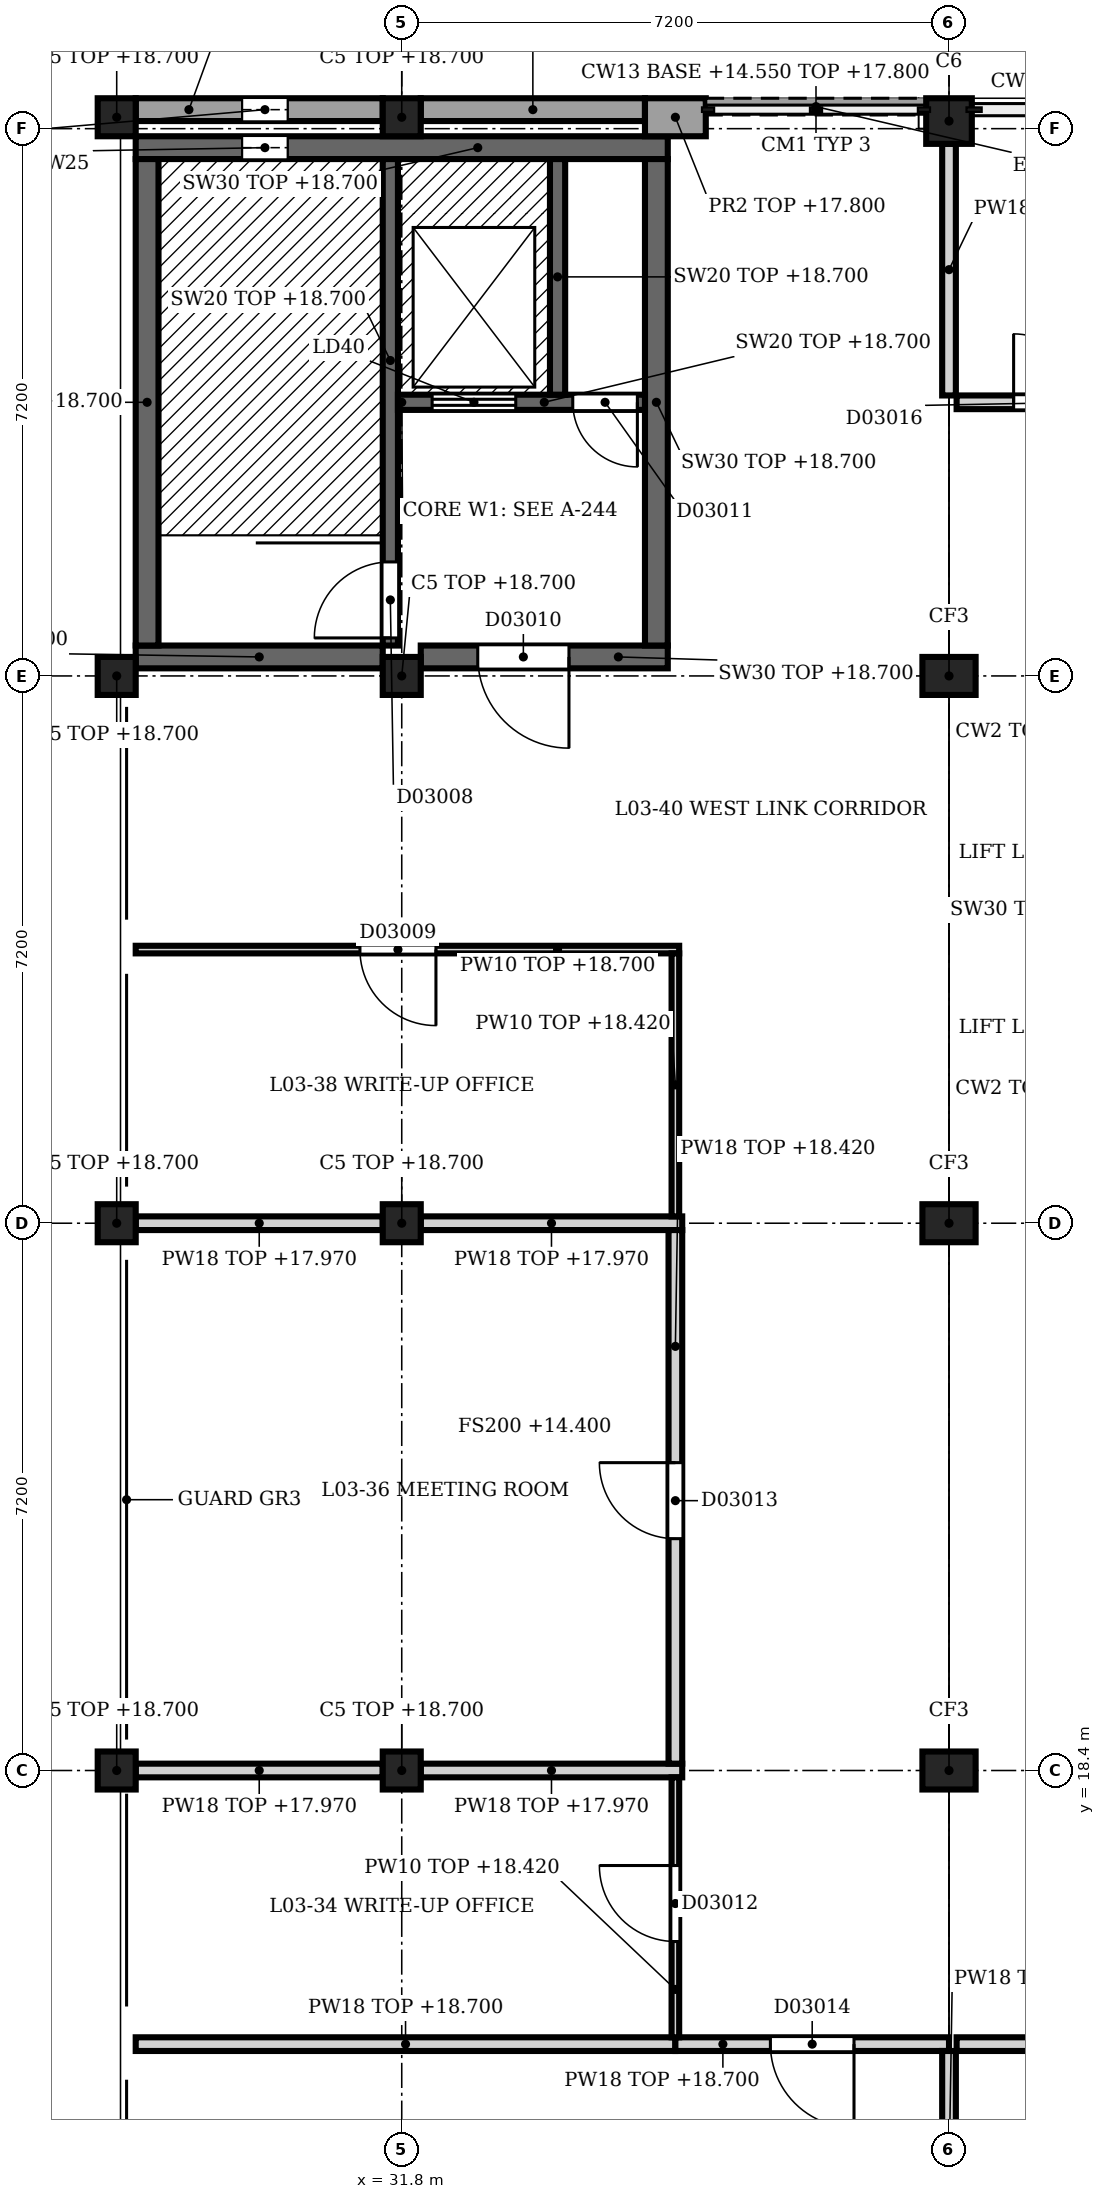
"""IFC4 building model, lengths in metres.
Left out: names, types, materials, properties, quantities, classifications, styles, units other than length and angle.
Written with IfcOpenShell. Run it as: python <this file> out.ifc"""

import sys

from ifc_helpers import new_model, si_unit, direction, frame, frame_2d, origin, origin_2d, place, context, subcontext, project, spatial, rectangle, extrude, element, fill, save


model = new_model("IFC4")
c1 = context("Model", 3, precision=1e-05, world=origin(), true_north=direction((0.0, 1.0)))
c2 = subcontext(c1, "Body", "Model", "MODEL_VIEW")
j1 = project(units=[si_unit("LENGTHUNIT", "METRE"), si_unit("PLANEANGLEUNIT", "RADIAN")], contexts=[c1])
p1 = place(None, origin())
s1 = spatial("IfcSite", under=j1, at=p1, CompositionType="ELEMENT")
p2 = place(p1, origin())
s2 = spatial("IfcBuilding", under=s1, at=p2, CompositionType="ELEMENT")
p3 = place(p2, frame((0.0, 0.0, 14.4)))
s3 = spatial("IfcBuildingStorey", under=s2, at=p3, CompositionType="ELEMENT", Elevation=14.4)
for number, where, z_axis, x_axis in (
    (1, (39.0, 18.4, 0.0), (0.0, 0.0, 1.0), (1.0, 0.0, 0.0)),
    (2, (39.0, 25.6, 0.0), (0.0, 0.0, 1.0), (1.0, 0.0, 0.0)),
    (3, (39.0, 32.8, 0.0), (0.0, 0.0, 1.0), (1.0, 0.0, 0.0)),
):
    element("IfcColumn", number, at=place(p3, frame(where, z_axis=z_axis, x_axis=x_axis)), inside=s3, PredefinedType="COLUMN", context=c2, shape_type="SweptSolid", body=[
        extrude(rectangle(XDim=0.7, YDim=0.5, at=origin_2d()), origin(), (0.0, 0.0, 1.0), 4.5),
    ])
p4 = place(p3, frame((39.0, 40.1, 0.0), z_axis=(0.0, 0.0, 1.0), x_axis=(1.0, 0.0, 0.0)))
e4 = element("IfcColumn", 4, at=p4, inside=s3, PredefinedType="COLUMN", context=c2, shape_type="SweptSolid", body=[
    extrude(rectangle(XDim=0.6, YDim=0.6, at=origin_2d()), origin(), (0.0, 0.0, 1.0), 4.5),
])
for number, where, z_axis, x_axis in (
    (5, (28.05, 18.4, 0.0), (0.0, 0.0, 1.0), (1.0, 0.0, 0.0)),
    (6, (28.05, 25.6, 0.0), (0.0, 0.0, 1.0), (1.0, 0.0, 0.0)),
    (7, (28.05, 32.8, 0.0), (0.0, 0.0, 1.0), (1.0, 0.0, 0.0)),
    (8, (28.05, 40.15, 0.0), (0.0, 0.0, 1.0), (1.0, 0.0, 0.0)),
    (9, (31.8, 18.4, 0.0), (0.0, 0.0, 1.0), (1.0, 0.0, 0.0)),
    (10, (31.8, 25.6, 0.0), (0.0, 0.0, 1.0), (1.0, 0.0, 0.0)),
    (11, (31.8, 32.8, 0.0), (0.0, 0.0, 1.0), (1.0, 0.0, 0.0)),
    (12, (31.8, 40.15, 0.0), (0.0, 0.0, 1.0), (1.0, 0.0, 0.0)),
):
    element("IfcColumn", number, at=place(p3, frame(where, z_axis=z_axis, x_axis=x_axis)), inside=s3, PredefinedType="COLUMN", context=c2, shape_type="SweptSolid", body=[
        extrude(rectangle(XDim=0.5, YDim=0.5, at=origin_2d()), origin(), (0.0, 0.0, 1.0), 4.3),
    ])
p5 = place(p3, frame((35.0, 40.15, 0.0), z_axis=(0.0, 0.0, 1.0), x_axis=(1.0, 0.0, 0.0)))
e13 = element("IfcWall", 13, at=p5, inside=s3, PredefinedType="SOLIDWALL", context=c2, shape_type="SweptSolid", body=[
    extrude(rectangle(XDim=0.8, YDim=0.5, at=frame_2d((0.4, 0.0))), origin(), (0.0, 0.0, 1.0), 3.4),
])
p6 = place(p3, frame((28.3, 40.25, 0.0), z_axis=(0.0, 0.0, 1.0), x_axis=(1.0, 0.0, 0.0)))
e14 = element("IfcWall", 14, at=p6, inside=s3, PredefinedType="SOLIDWALL", context=c2, shape_type="SweptSolid", body=[
    extrude(rectangle(XDim=3.25, YDim=0.3, at=frame_2d((1.625, 0.0))), origin(), (0.0, 0.0, 1.0), 3.4),
])
p7 = place(p6, frame((1.4, 0.0, 1.2)))
e15 = element("IfcOpeningElement", 15, at=p7, cuts=e14, PredefinedType="OPENING", context=c2, shape_type="SweptSolid", body=[
    extrude(rectangle(XDim=0.6, YDim=1.8, at=frame_2d((0.3, 0.9))), frame((0.0, 0.16, 0.0), z_axis=(0.0, -1.0, 0.0), x_axis=(1.0, 0.0, 0.0)), (0.0, 0.0, 1.0), 0.32),
])
p8 = place(p3, frame((32.05, 40.25, 0.0), z_axis=(0.0, 0.0, 1.0), x_axis=(1.0, 0.0, 0.0)))
e16 = element("IfcWall", 16, at=p8, inside=s3, PredefinedType="SOLIDWALL", context=c2, shape_type="SweptSolid", body=[
    extrude(rectangle(XDim=2.95, YDim=0.3, at=frame_2d((1.475, 0.0))), origin(), (0.0, 0.0, 1.0), 3.4),
])
p9 = place(p3, frame((35.8, 40.29, 0.0), z_axis=(0.0, 0.0, 1.0), x_axis=(1.0, 0.0, 0.0)))
e17 = element("IfcWall", 17, at=p9, inside=s3, PredefinedType="SOLIDWALL", context=c2, shape_type="SweptSolid", body=[
    extrude(rectangle(XDim=2.9, YDim=0.22, at=frame_2d((1.45, 0.0))), origin(), (0.0, 0.0, 1.0), 0.15),
])
p10 = place(p3, frame((28.3, 33.05, 0.0), z_axis=(0.0, 0.0, 1.0), x_axis=(1.0, 0.0, 0.0)))
e18 = element("IfcWall", 18, at=p10, inside=s3, PredefinedType="SHEAR", context=c2, shape_type="SweptSolid", body=[
    extrude(rectangle(XDim=3.25, YDim=0.3, at=frame_2d((1.625, 0.0))), origin(), (0.0, 0.0, 1.0), 4.3),
])
p11 = place(p3, frame((32.05, 33.05, 0.0), z_axis=(0.0, 0.0, 1.0), x_axis=(1.0, 0.0, 0.0)))
e19 = element("IfcWall", 19, at=p11, inside=s3, PredefinedType="SHEAR", context=c2, shape_type="SweptSolid", body=[
    extrude(rectangle(XDim=3.25, YDim=0.3, at=frame_2d((1.625, 0.0))), origin(), (0.0, 0.0, 1.0), 4.3),
])
p12 = place(p11, frame((0.75, 0.0, 0.0)))
e20 = element("IfcOpeningElement", 20, at=p12, cuts=e19, PredefinedType="OPENING", context=c2, shape_type="SweptSolid", body=[
    extrude(rectangle(XDim=1.2, YDim=2.1, at=frame_2d((0.6, 1.05))), frame((0.0, 0.16, 0.0), z_axis=(0.0, -1.0, 0.0), x_axis=(1.0, 0.0, 0.0)), (0.0, 0.0, 1.0), 0.32),
])
p13 = place(p3, frame((28.3, 39.75, 0.0), z_axis=(0.0, 0.0, 1.0), x_axis=(1.0, 0.0, 0.0)))
e21 = element("IfcWall", 21, at=p13, inside=s3, PredefinedType="SHEAR", context=c2, shape_type="SweptSolid", body=[
    extrude(rectangle(XDim=7.0, YDim=0.3, at=frame_2d((3.5, 0.0))), origin(), (0.0, 0.0, 1.0), 4.3),
])
p14 = place(p13, frame((1.4, 0.0, 1.2)))
e22 = element("IfcOpeningElement", 22, at=p14, cuts=e21, PredefinedType="OPENING", context=c2, shape_type="SweptSolid", body=[
    extrude(rectangle(XDim=0.6, YDim=1.8, at=frame_2d((0.3, 0.9))), frame((0.0, 0.16, 0.0), z_axis=(0.0, -1.0, 0.0), x_axis=(1.0, 0.0, 0.0)), (0.0, 0.0, 1.0), 0.32),
])
for number, where, z_axis, x_axis in (
    (23, (28.45, 33.2, 0.0), (0.0, 0.0, 1.0), (0.0, 1.0, 0.0)),
    (24, (35.15, 33.2, 0.0), (0.0, 0.0, 1.0), (0.0, 1.0, 0.0)),
):
    element("IfcWall", number, at=place(p3, frame(where, z_axis=z_axis, x_axis=x_axis)), inside=s3, PredefinedType="SHEAR", context=c2, shape_type="SweptSolid", body=[
        extrude(rectangle(XDim=6.4, YDim=0.3, at=frame_2d((3.2, 0.0))), origin(), (0.0, 0.0, 1.0), 4.3),
    ])
p15 = place(p3, frame((31.65, 33.2, 0.0), z_axis=(0.0, 0.0, 1.0), x_axis=(0.0, 1.0, 0.0)))
e25 = element("IfcWall", 25, at=p15, inside=s3, PredefinedType="SHEAR", context=c2, shape_type="SweptSolid", body=[
    extrude(rectangle(XDim=6.4, YDim=0.2, at=frame_2d((3.2, 0.0))), origin(), (0.0, 0.0, 1.0), 4.3),
])
p16 = place(p15, frame((0.1, 0.0, 0.0)))
e26 = element("IfcOpeningElement", 26, at=p16, cuts=e25, PredefinedType="OPENING", context=c2, shape_type="SweptSolid", body=[
    extrude(rectangle(XDim=1.0, YDim=2.1, at=frame_2d((0.5, 1.05))), frame((0.0, 0.11, 0.0), z_axis=(0.0, -1.0, 0.0), x_axis=(1.0, 0.0, 0.0)), (0.0, 0.0, 1.0), 0.22),
])
p17 = place(p3, frame((35.0, 36.4, 0.0), z_axis=(0.0, 0.0, 1.0), x_axis=(-1.0, 0.0, 0.0)))
e27 = element("IfcWall", 27, at=p17, inside=s3, PredefinedType="SHEAR", context=c2, shape_type="SweptSolid", body=[
    extrude(rectangle(XDim=3.25, YDim=0.2, at=frame_2d((1.625, 0.0))), origin(), (0.0, 0.0, 1.0), 4.3),
])
p18 = place(p17, frame((1.7, 0.0, 0.0)))
e28 = element("IfcOpeningElement", 28, at=p18, cuts=e27, PredefinedType="OPENING", context=c2, shape_type="SweptSolid", body=[
    extrude(rectangle(XDim=1.1, YDim=2.1, at=frame_2d((0.55, 1.05))), frame((0.0, 0.11, 0.0), z_axis=(0.0, -1.0, 0.0), x_axis=(1.0, 0.0, 0.0)), (0.0, 0.0, 1.0), 0.22),
])
p19 = place(p17, frame((0.1, 0.0, 0.0)))
e29 = element("IfcOpeningElement", 29, at=p19, cuts=e27, PredefinedType="OPENING", context=c2, shape_type="SweptSolid", body=[
    extrude(rectangle(XDim=0.85, YDim=2.1, at=frame_2d((0.425, 1.05))), frame((0.0, 0.11, 0.0), z_axis=(0.0, -1.0, 0.0), x_axis=(1.0, 0.0, 0.0)), (0.0, 0.0, 1.0), 0.22),
])
p20 = place(p3, frame((33.85, 36.5, 0.0), z_axis=(0.0, 0.0, 1.0), x_axis=(0.0, 1.0, 0.0)))
e30 = element("IfcWall", 30, at=p20, inside=s3, PredefinedType="SHEAR", context=c2, shape_type="SweptSolid", body=[
    extrude(rectangle(XDim=3.1, YDim=0.2, at=frame_2d((1.55, 0.0))), origin(), (0.0, 0.0, 1.0), 4.3),
])
p21 = place(p3, frame((28.3, 14.8, 0.0), z_axis=(0.0, 0.0, 1.0), x_axis=(1.0, 0.0, 0.0)))
e31 = element("IfcWall", 31, at=p21, inside=s3, PredefinedType="PARTITIONING", context=c2, shape_type="SweptSolid", body=[
    extrude(rectangle(XDim=7.1, YDim=0.18, at=frame_2d((3.55, 0.0))), origin(), (0.0, 0.0, 1.0), 4.3),
])
p22 = place(p3, frame((39.0, 14.8, 0.0), z_axis=(0.0, 0.0, 1.0), x_axis=(-1.0, 0.0, 0.0)))
e32 = element("IfcWall", 32, at=p22, inside=s3, PredefinedType="PARTITIONING", context=c2, shape_type="SweptSolid", body=[
    extrude(rectangle(XDim=3.6, YDim=0.18, at=frame_2d((1.8, 0.0))), origin(), (0.0, 0.0, 1.0), 4.3),
])
p23 = place(p22, frame((1.25, 0.0, 0.0)))
e33 = element("IfcOpeningElement", 33, at=p23, cuts=e32, PredefinedType="OPENING", context=c2, shape_type="SweptSolid", body=[
    extrude(rectangle(XDim=1.1, YDim=2.3, at=frame_2d((0.55, 1.15))), frame((0.0, 0.1, 0.0), z_axis=(0.0, -1.0, 0.0), x_axis=(1.0, 0.0, 0.0)), (0.0, 0.0, 1.0), 0.2),
])
p24 = place(p3, frame((42.5, 14.8, 0.0), z_axis=(0.0, 0.0, 1.0), x_axis=(-1.0, 0.0, 0.0)))
e34 = element("IfcWall", 34, at=p24, inside=s3, PredefinedType="PARTITIONING", context=c2, shape_type="SweptSolid", body=[
    extrude(rectangle(XDim=3.4, YDim=0.18, at=frame_2d((1.7, 0.0))), origin(), (0.0, 0.0, 1.0), 11.4),
])
p25 = place(p24, frame((1.15, 0.0, 0.0)))
e35 = element("IfcOpeningElement", 35, at=p25, cuts=e34, PredefinedType="OPENING", context=c2, shape_type="SweptSolid", body=[
    extrude(rectangle(XDim=1.1, YDim=2.3, at=frame_2d((0.55, 1.15))), frame((0.0, 0.1, 0.0), z_axis=(0.0, -1.0, 0.0), x_axis=(1.0, 0.0, 0.0)), (0.0, 0.0, 1.0), 0.2),
])
p26 = place(p3, frame((28.3, 18.4, 0.0), z_axis=(0.0, 0.0, 1.0), x_axis=(1.0, 0.0, 0.0)))
e36 = element("IfcWall", 36, at=p26, inside=s3, PredefinedType="PARTITIONING", context=c2, shape_type="SweptSolid", body=[
    extrude(rectangle(XDim=3.25, YDim=0.18, at=frame_2d((1.625, 0.0))), origin(), (0.0, 0.0, 1.0), 3.57),
])
p27 = place(p3, frame((32.05, 18.4, 0.0), z_axis=(0.0, 0.0, 1.0), x_axis=(1.0, 0.0, 0.0)))
e37 = element("IfcWall", 37, at=p27, inside=s3, PredefinedType="PARTITIONING", context=c2, shape_type="SweptSolid", body=[
    extrude(rectangle(XDim=3.44, YDim=0.18, at=frame_2d((1.72, 0.0))), origin(), (0.0, 0.0, 1.0), 3.57),
])
p28 = place(p3, frame((28.3, 25.6, 0.0), z_axis=(0.0, 0.0, 1.0), x_axis=(1.0, 0.0, 0.0)))
e38 = element("IfcWall", 38, at=p28, inside=s3, PredefinedType="PARTITIONING", context=c2, shape_type="SweptSolid", body=[
    extrude(rectangle(XDim=3.25, YDim=0.18, at=frame_2d((1.625, 0.0))), origin(), (0.0, 0.0, 1.0), 3.57),
])
p29 = place(p3, frame((32.05, 25.6, 0.0), z_axis=(0.0, 0.0, 1.0), x_axis=(1.0, 0.0, 0.0)))
e39 = element("IfcWall", 39, at=p29, inside=s3, PredefinedType="PARTITIONING", context=c2, shape_type="SweptSolid", body=[
    extrude(rectangle(XDim=3.44, YDim=0.18, at=frame_2d((1.72, 0.0))), origin(), (0.0, 0.0, 1.0), 3.57),
])
p30 = place(p3, frame((35.45, 29.2, 0.0), z_axis=(0.0, 0.0, 1.0), x_axis=(-1.0, 0.0, 0.0)))
e40 = element("IfcWall", 40, at=p30, inside=s3, PredefinedType="PARTITIONING", context=c2, shape_type="SweptSolid", body=[
    extrude(rectangle(XDim=7.15, YDim=0.1, at=frame_2d((3.575, 0.0))), origin(), (0.0, 0.0, 1.0), 4.3),
])
p31 = place(p30, frame((3.2, 0.0, 0.0)))
e41 = element("IfcOpeningElement", 41, at=p31, cuts=e40, PredefinedType="OPENING", context=c2, shape_type="SweptSolid", body=[
    extrude(rectangle(XDim=1.0, YDim=2.1, at=frame_2d((0.5, 1.05))), frame((0.0, 0.06, 0.0), z_axis=(0.0, -1.0, 0.0), x_axis=(1.0, 0.0, 0.0)), (0.0, 0.0, 1.0), 0.12),
])
p32 = place(p3, frame((42.5, 36.4, 0.0), z_axis=(0.0, 0.0, 1.0), x_axis=(-1.0, 0.0, 0.0)))
e42 = element("IfcWall", 42, at=p32, inside=s3, PredefinedType="PARTITIONING", context=c2, shape_type="SweptSolid", body=[
    extrude(rectangle(XDim=3.4, YDim=0.18, at=frame_2d((1.7, 0.0))), origin(), (0.0, 0.0, 1.0), 11.4),
])
p33 = place(p32, frame((0.85, 0.0, 0.0)))
e43 = element("IfcOpeningElement", 43, at=p33, cuts=e42, PredefinedType="OPENING", context=c2, shape_type="SweptSolid", body=[
    extrude(rectangle(XDim=1.8, YDim=2.3, at=frame_2d((0.9, 1.15))), frame((0.0, 0.1, 0.0), z_axis=(0.0, -1.0, 0.0), x_axis=(1.0, 0.0, 0.0)), (0.0, 0.0, 1.0), 0.2),
])
p34 = place(p3, frame((35.4, 14.89, 0.0), z_axis=(0.0, 0.0, 1.0), x_axis=(0.0, 1.0, 0.0)))
e44 = element("IfcWall", 44, at=p34, inside=s3, PredefinedType="PARTITIONING", context=c2, shape_type="SweptSolid", body=[
    extrude(rectangle(XDim=3.42, YDim=0.1, at=frame_2d((1.71, 0.0))), origin(), (0.0, 0.0, 1.0), 4.02),
])
p35 = place(p34, frame((1.26, 0.0, 0.0)))
e45 = element("IfcOpeningElement", 45, at=p35, cuts=e44, PredefinedType="OPENING", context=c2, shape_type="SweptSolid", body=[
    extrude(rectangle(XDim=1.0, YDim=2.1, at=frame_2d((0.5, 1.05))), frame((0.0, 0.06, 0.0), z_axis=(0.0, -1.0, 0.0), x_axis=(1.0, 0.0, 0.0)), (0.0, 0.0, 1.0), 0.12),
])
p36 = place(p3, frame((35.4, 18.49, 0.0), z_axis=(0.0, 0.0, 1.0), x_axis=(0.0, 1.0, 0.0)))
e46 = element("IfcWall", 46, at=p36, inside=s3, PredefinedType="PARTITIONING", context=c2, shape_type="SweptSolid", body=[
    extrude(rectangle(XDim=7.02, YDim=0.18, at=frame_2d((3.51, 0.0))), origin(), (0.0, 0.0, 1.0), 4.02),
])
p37 = place(p36, frame((2.96, 0.0, 0.0)))
e47 = element("IfcOpeningElement", 47, at=p37, cuts=e46, PredefinedType="OPENING", context=c2, shape_type="SweptSolid", body=[
    extrude(rectangle(XDim=1.0, YDim=2.1, at=frame_2d((0.5, 1.05))), frame((0.0, 0.1, 0.0), z_axis=(0.0, -1.0, 0.0), x_axis=(1.0, 0.0, 0.0)), (0.0, 0.0, 1.0), 0.2),
])
p38 = place(p3, frame((35.4, 25.69, 0.0), z_axis=(0.0, 0.0, 1.0), x_axis=(0.0, 1.0, 0.0)))
e48 = element("IfcWall", 48, at=p38, inside=s3, PredefinedType="PARTITIONING", context=c2, shape_type="SweptSolid", body=[
    extrude(rectangle(XDim=3.46, YDim=0.1, at=frame_2d((1.73, 0.0))), origin(), (0.0, 0.0, 1.0), 4.02),
])
for number, where, z_axis, x_axis in (
    (49, (39.0, 11.4, 0.0), (0.0, 0.0, 1.0), (0.0, 1.0, 0.0)),
    (50, (39.0, 36.49, 0.0), (0.0, 0.0, 1.0), (0.0, 1.0, 0.0)),
):
    element("IfcWall", number, at=place(p3, frame(where, z_axis=z_axis, x_axis=x_axis)), inside=s3, PredefinedType="PARTITIONING", context=c2, shape_type="SweptSolid", body=[
        extrude(rectangle(XDim=3.31, YDim=0.18, at=frame_2d((1.655, 0.0))), origin(), (0.0, 0.0, 1.0), 3.77),
    ])
p39 = place(p7, origin())
e51 = element("IfcWindow", 51, at=p39, inside=s3, PartitioningType="SINGLE_PANEL", PredefinedType="WINDOW", context=c2, shape_type="SweptSolid", body=[
    extrude(rectangle(XDim=0.6, YDim=1.8, at=frame_2d((0.3, 0.9))), frame((0.0, 0.03, 0.0), z_axis=(0.0, -1.0, 0.0), x_axis=(1.0, 0.0, 0.0)), (0.0, 0.0, 1.0), 0.06),
])
fill(e15, e51)
p40 = place(p12, origin())
e52 = element("IfcDoor", 52, at=p40, inside=s3, OperationType="SINGLE_SWING_LEFT", PredefinedType="DOOR", context=c2, shape_type="SweptSolid", body=[
    extrude(rectangle(XDim=1.2, YDim=2.1, at=frame_2d((0.6, 1.05))), frame((0.0, 0.025, 0.0), z_axis=(0.0, -1.0, 0.0), x_axis=(1.0, 0.0, 0.0)), (0.0, 0.0, 1.0), 0.05),
])
fill(e20, e52)
p41 = place(p18, origin())
e53 = element("IfcDoor", 53, at=p41, inside=s3, OperationType="DOUBLE_DOOR_SLIDING", PredefinedType="DOOR", context=c2, shape_type="SweptSolid", body=[
    extrude(rectangle(XDim=1.1, YDim=2.1, at=frame_2d((0.55, 1.05))), frame((0.0, 0.025, 0.0), z_axis=(0.0, -1.0, 0.0), x_axis=(1.0, 0.0, 0.0)), (0.0, 0.0, 1.0), 0.05),
])
fill(e28, e53)
p42 = place(p19, origin())
e54 = element("IfcDoor", 54, at=p42, inside=s3, OperationType="SINGLE_SWING_LEFT", PredefinedType="DOOR", context=c2, shape_type="SweptSolid", body=[
    extrude(rectangle(XDim=0.85, YDim=2.1, at=frame_2d((0.425, 1.05))), frame((0.0, 0.025, 0.0), z_axis=(0.0, -1.0, 0.0), x_axis=(1.0, 0.0, 0.0)), (0.0, 0.0, 1.0), 0.05),
])
fill(e29, e54)
p43 = place(p16, origin())
e55 = element("IfcDoor", 55, at=p43, inside=s3, OperationType="SINGLE_SWING_LEFT", PredefinedType="DOOR", context=c2, shape_type="SweptSolid", body=[
    extrude(rectangle(XDim=1.0, YDim=2.1, at=frame_2d((0.5, 1.05))), frame((0.0, 0.025, 0.0), z_axis=(0.0, -1.0, 0.0), x_axis=(1.0, 0.0, 0.0)), (0.0, 0.0, 1.0), 0.05),
])
fill(e26, e55)
p44 = place(p14, origin())
e56 = element("IfcWindow", 56, at=p44, inside=s3, PartitioningType="SINGLE_PANEL", PredefinedType="WINDOW", context=c2, shape_type="SweptSolid", body=[
    extrude(rectangle(XDim=0.6, YDim=1.8, at=frame_2d((0.3, 0.9))), frame((0.0, 0.03, 0.0), z_axis=(0.0, -1.0, 0.0), x_axis=(1.0, 0.0, 0.0)), (0.0, 0.0, 1.0), 0.06),
])
fill(e22, e56)
p45 = place(p23, origin())
e57 = element("IfcDoor", 57, at=p45, inside=s3, OperationType="SINGLE_SWING_LEFT", PredefinedType="DOOR", context=c2, shape_type="SweptSolid", body=[
    extrude(rectangle(XDim=1.1, YDim=2.3, at=frame_2d((0.55, 1.15))), frame((0.0, 0.025, 0.0), z_axis=(0.0, -1.0, 0.0), x_axis=(1.0, 0.0, 0.0)), (0.0, 0.0, 1.0), 0.05),
])
fill(e33, e57)
p46 = place(p31, origin())
e58 = element("IfcDoor", 58, at=p46, inside=s3, OperationType="SINGLE_SWING_RIGHT", PredefinedType="DOOR", context=c2, shape_type="SweptSolid", body=[
    extrude(rectangle(XDim=1.0, YDim=2.1, at=frame_2d((0.5, 1.05))), frame((0.0, 0.025, 0.0), z_axis=(0.0, -1.0, 0.0), x_axis=(1.0, 0.0, 0.0)), (0.0, 0.0, 1.0), 0.05),
])
fill(e41, e58)
p47 = place(p33, origin())
e59 = element("IfcDoor", 59, at=p47, inside=s3, OperationType="SINGLE_SWING_LEFT", PredefinedType="DOOR", context=c2, shape_type="SweptSolid", body=[
    extrude(rectangle(XDim=1.8, YDim=2.3, at=frame_2d((0.9, 1.15))), frame((0.0, 0.025, 0.0), z_axis=(0.0, -1.0, 0.0), x_axis=(1.0, 0.0, 0.0)), (0.0, 0.0, 1.0), 0.05),
])
fill(e43, e59)
p48 = place(p35, origin())
e60 = element("IfcDoor", 60, at=p48, inside=s3, OperationType="SINGLE_SWING_RIGHT", PredefinedType="DOOR", context=c2, shape_type="SweptSolid", body=[
    extrude(rectangle(XDim=1.0, YDim=2.1, at=frame_2d((0.5, 1.05))), frame((0.0, 0.025, 0.0), z_axis=(0.0, -1.0, 0.0), x_axis=(1.0, 0.0, 0.0)), (0.0, 0.0, 1.0), 0.05),
])
fill(e45, e60)
p49 = place(p37, origin())
e61 = element("IfcDoor", 61, at=p49, inside=s3, OperationType="SINGLE_SWING_LEFT", PredefinedType="DOOR", context=c2, shape_type="SweptSolid", body=[
    extrude(rectangle(XDim=1.0, YDim=2.1, at=frame_2d((0.5, 1.05))), frame((0.0, 0.025, 0.0), z_axis=(0.0, -1.0, 0.0), x_axis=(1.0, 0.0, 0.0)), (0.0, 0.0, 1.0), 0.05),
])
fill(e47, e61)
save(model, sys.argv[1])
